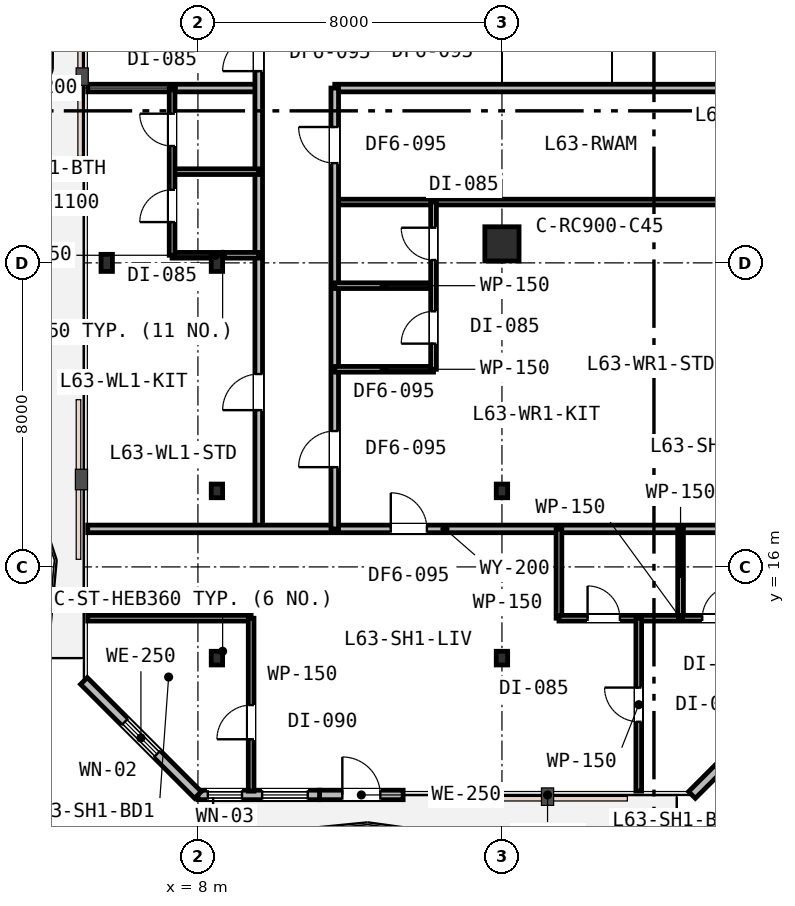
"""IFC4 building model, lengths in metres.
Left out: names, types, materials, properties, quantities, classifications, styles, units other than length and angle.
Written with IfcOpenShell. Run it as: python <this file> out.ifc"""

import sys

from ifc_helpers import new_model, si_unit, direction, frame, frame_2d, origin, origin_2d, place, context, subcontext, project, spatial, rectangle, i_section, extrude, element, fill, save


model = new_model("IFC4")
c1 = context("Model", 3, precision=1e-05, world=origin(), true_north=direction((0.0, 1.0)))
c2 = subcontext(c1, "Body", "Model", "MODEL_VIEW")
j1 = project(units=[si_unit("LENGTHUNIT", "METRE"), si_unit("PLANEANGLEUNIT", "RADIAN")], contexts=[c1])
p1 = place(None, origin())
s1 = spatial("IfcSite", under=j1, at=p1, CompositionType="ELEMENT")
p2 = place(p1, origin())
s2 = spatial("IfcBuilding", under=s1, at=p2, CompositionType="ELEMENT")
p3 = place(p2, frame((0.0, 0.0, 245.0)))
s3 = spatial("IfcBuildingStorey", under=s2, at=p3, CompositionType="ELEMENT", Elevation=245.0)
p4 = place(p3, frame((8.5, 24.0, 0.0), z_axis=(0.0, 0.0, 1.0), x_axis=(1.0, 0.0, 0.0)))
e1 = element("IfcColumn", 1, at=p4, inside=s3, PredefinedType="COLUMN", context=c2, shape_type="SweptSolid", body=[
    extrude(i_section(OverallWidth=0.3, OverallDepth=0.45, WebThickness=0.014, FlangeThickness=0.026, FilletRadius=0.027, at=origin_2d()), origin(), (0.0, 0.0, 1.0), 3.8),
])
p5 = place(p3, frame((16.0, 24.5, 0.0), z_axis=(0.0, 0.0, 1.0), x_axis=(1.0, 0.0, 0.0)))
e2 = element("IfcColumn", 2, at=p5, inside=s3, PredefinedType="COLUMN", context=c2, shape_type="SweptSolid", body=[
    extrude(rectangle(XDim=0.9, YDim=0.9, at=origin_2d()), origin(), (0.0, 0.0, 1.0), 3.8),
])
p6 = place(p3, frame((5.6, 24.0, 0.0), z_axis=(0.0, 0.0, 1.0), x_axis=(1.0, 0.0, 0.0)))
e3 = element("IfcColumn", 3, at=p6, inside=s3, PredefinedType="COLUMN", context=c2, shape_type="SweptSolid", body=[
    extrude(i_section(OverallWidth=0.3, OverallDepth=0.45, WebThickness=0.014, FlangeThickness=0.026, FilletRadius=0.027, at=origin_2d()), origin(), (0.0, 0.0, 1.0), 3.8),
])
for number, where, z_axis, x_axis in (
    (4, (8.5, 13.6, 0.0), (0.0, 0.0, 1.0), (1.0, 0.0, 0.0)),
    (5, (16.0, 13.6, 0.0), (0.0, 0.0, 1.0), (1.0, 0.0, 0.0)),
    (6, (8.5, 18.0, 0.0), (0.0, 0.0, 1.0), (1.0, 0.0, 0.0)),
    (7, (16.0, 18.0, 0.0), (0.0, 0.0, 1.0), (1.0, 0.0, 0.0)),
):
    element("IfcColumn", number, at=place(p3, frame(where, z_axis=z_axis, x_axis=x_axis)), inside=s3, PredefinedType="COLUMN", context=c2, shape_type="SweptSolid", body=[
        extrude(i_section(OverallWidth=0.3, OverallDepth=0.36, WebThickness=0.013, FlangeThickness=0.022, FilletRadius=0.027, at=origin_2d()), origin(), (0.0, 0.0, 1.0), 3.8),
    ])
p7 = place(p3, frame((11.2, 10.0, 0.0), z_axis=(0.0, 0.0, 1.0), x_axis=(1.0, 0.0, 0.0)))
e8 = element("IfcWall", 8, at=p7, inside=s3, PredefinedType="STANDARD", context=c2, shape_type="SweptSolid", body=[
    extrude(rectangle(XDim=2.2, YDim=0.25, at=frame_2d((1.1, 0.0))), origin(), (0.0, 0.0, 1.0), 3.53),
])
p8 = place(p7, frame((0.6, 0.0, 0.0)))
e9 = element("IfcOpeningElement", 9, at=p8, cuts=e8, PredefinedType="OPENING", context=c2, shape_type="SweptSolid", body=[
    extrude(rectangle(XDim=1.0, YDim=2.15, at=frame_2d((0.5, 1.075))), frame((0.0, 0.135, 0.0), z_axis=(0.0, -1.0, 0.0), x_axis=(1.0, 0.0, 0.0)), (0.0, 0.0, 1.0), 0.27),
])
p9 = place(p3, frame((8.0, 10.0, 0.0), z_axis=(0.0, 0.0, 1.0), x_axis=(1.0, 0.0, 0.0)))
e10 = element("IfcWall", 10, at=p9, inside=s3, PredefinedType="STANDARD", context=c2, shape_type="SweptSolid", body=[
    extrude(rectangle(XDim=3.2, YDim=0.25, at=frame_2d((1.6, 0.0))), origin(), (0.0, 0.0, 1.0), 3.53),
])
p10 = place(p9, frame((0.26, 0.0, 0.9)))
e11 = element("IfcOpeningElement", 11, at=p10, cuts=e10, PredefinedType="OPENING", context=c2, shape_type="SweptSolid", body=[
    extrude(rectangle(XDim=0.9, YDim=1.55, at=frame_2d((0.45, 0.775))), frame((0.0, 0.135, 0.0), z_axis=(0.0, -1.0, 0.0), x_axis=(1.0, 0.0, 0.0)), (0.0, 0.0, 1.0), 0.27),
])
p11 = place(p9, frame((1.69, 0.0, 0.85)))
e12 = element("IfcOpeningElement", 12, at=p11, cuts=e10, PredefinedType="OPENING", context=c2, shape_type="SweptSolid", body=[
    extrude(rectangle(XDim=1.2, YDim=1.6, at=frame_2d((0.6, 0.8))), frame((0.0, 0.135, 0.0), z_axis=(0.0, -1.0, 0.0), x_axis=(1.0, 0.0, 0.0)), (0.0, 0.0, 1.0), 0.27),
])
p12 = place(p3, frame((21.0, 10.0, 0.0), z_axis=(0.0, 0.0, 1.0), x_axis=(0.707106781187, 0.707106781187, 0.0)))
e13 = element("IfcWall", 13, at=p12, inside=s3, PredefinedType="STANDARD", context=c2, shape_type="SweptSolid", body=[
    extrude(rectangle(XDim=4.243, YDim=0.25, at=frame_2d((2.121, 0.0))), origin(), (0.0, 0.0, 1.0), 3.53),
])
p13 = place(p12, frame((1.521, 0.0, 0.85)))
e14 = element("IfcOpeningElement", 14, at=p13, cuts=e13, PredefinedType="OPENING", context=c2, shape_type="SweptSolid", body=[
    extrude(rectangle(XDim=1.2, YDim=1.6, at=frame_2d((0.6, 0.8))), frame((0.0, 0.135, 0.0), z_axis=(0.0, -1.0, 0.0), x_axis=(1.0, 0.0, 0.0)), (0.0, 0.0, 1.0), 0.27),
])
p14 = place(p3, frame((5.0, 13.0, 0.0), z_axis=(0.0, 0.0, 1.0), x_axis=(0.707106781187, -0.707106781187, 0.0)))
e15 = element("IfcWall", 15, at=p14, inside=s3, PredefinedType="STANDARD", context=c2, shape_type="SweptSolid", body=[
    extrude(rectangle(XDim=4.243, YDim=0.25, at=frame_2d((2.121, 0.0))), origin(), (0.0, 0.0, 1.0), 3.53),
])
p15 = place(p14, frame((1.521, 0.0, 0.85)))
e16 = element("IfcOpeningElement", 16, at=p15, cuts=e15, PredefinedType="OPENING", context=c2, shape_type="SweptSolid", body=[
    extrude(rectangle(XDim=1.2, YDim=1.6, at=frame_2d((0.6, 0.8))), frame((0.0, 0.135, 0.0), z_axis=(0.0, -1.0, 0.0), x_axis=(1.0, 0.0, 0.0)), (0.0, 0.0, 1.0), 0.27),
])
p16 = place(p3, frame((5.1, 28.6, 0.0), z_axis=(0.0, 0.0, 1.0), x_axis=(1.0, 0.0, 0.0)))
e17 = element("IfcWall", 17, at=p16, inside=s3, PredefinedType="PARTITIONING", context=c2, shape_type="SweptSolid", body=[
    extrude(rectangle(XDim=4.5, YDim=0.2, at=frame_2d((2.25, 0.0))), origin(), (0.0, 0.0, 1.0), 3.16),
])
p17 = place(p3, frame((11.6, 28.6, 0.0), z_axis=(0.0, 0.0, 1.0), x_axis=(1.0, 0.0, 0.0)))
e18 = element("IfcWall", 18, at=p17, inside=s3, PredefinedType="PARTITIONING", context=c2, shape_type="SweptSolid", body=[
    extrude(rectangle(XDim=34.3, YDim=0.2, at=frame_2d((17.15, 0.0))), origin(), (0.0, 0.0, 1.0), 3.16),
])
p18 = place(p17, frame((14.625, 0.0, 0.0)))
e19 = element("IfcOpeningElement", 19, at=p18, cuts=e18, PredefinedType="OPENING", context=c2, shape_type="SweptSolid", body=[
    extrude(rectangle(XDim=0.95, YDim=2.15, at=frame_2d((0.475, 1.075))), frame((0.0, 0.11, 0.0), z_axis=(0.0, -1.0, 0.0), x_axis=(1.0, 0.0, 0.0)), (0.0, 0.0, 1.0), 0.22),
])
p19 = place(p17, frame((26.225, 0.0, 0.0)))
e20 = element("IfcOpeningElement", 20, at=p19, cuts=e18, PredefinedType="OPENING", context=c2, shape_type="SweptSolid", body=[
    extrude(rectangle(XDim=0.95, YDim=2.15, at=frame_2d((0.475, 1.075))), frame((0.0, 0.11, 0.0), z_axis=(0.0, -1.0, 0.0), x_axis=(1.0, 0.0, 0.0)), (0.0, 0.0, 1.0), 0.22),
])
p20 = place(p3, frame((9.6, 17.0, 0.0), z_axis=(0.0, 0.0, 1.0), x_axis=(0.0, 1.0, 0.0)))
e21 = element("IfcWall", 21, at=p20, inside=s3, PredefinedType="PARTITIONING", context=c2, shape_type="SweptSolid", body=[
    extrude(rectangle(XDim=25.9, YDim=0.2, at=frame_2d((12.95, 0.0))), origin(), (0.0, 0.0, 1.0), 3.16),
])
p21 = place(p20, frame((12.045, 0.0, 0.0)))
e22 = element("IfcOpeningElement", 22, at=p21, cuts=e21, PredefinedType="OPENING", context=c2, shape_type="SweptSolid", body=[
    extrude(rectangle(XDim=0.95, YDim=2.15, at=frame_2d((0.475, 1.075))), frame((0.0, 0.11, 0.0), z_axis=(0.0, -1.0, 0.0), x_axis=(1.0, 0.0, 0.0)), (0.0, 0.0, 1.0), 0.22),
])
p22 = place(p20, frame((3.125, 0.0, 0.0)))
e23 = element("IfcOpeningElement", 23, at=p22, cuts=e21, PredefinedType="OPENING", context=c2, shape_type="SweptSolid", body=[
    extrude(rectangle(XDim=0.95, YDim=2.15, at=frame_2d((0.475, 1.075))), frame((0.0, 0.11, 0.0), z_axis=(0.0, -1.0, 0.0), x_axis=(1.0, 0.0, 0.0)), (0.0, 0.0, 1.0), 0.22),
])
p23 = place(p3, frame((5.1, 17.0, 0.0), z_axis=(0.0, 0.0, 1.0), x_axis=(1.0, 0.0, 0.0)))
e24 = element("IfcWall", 24, at=p23, inside=s3, PredefinedType="PARTITIONING", context=c2, shape_type="SweptSolid", body=[
    extrude(rectangle(XDim=18.8, YDim=0.2, at=frame_2d((9.4, 0.0))), origin(), (0.0, 0.0, 1.0), 3.16),
])
p24 = place(p23, frame((7.975, 0.0, 0.0)))
e25 = element("IfcOpeningElement", 25, at=p24, cuts=e24, PredefinedType="OPENING", context=c2, shape_type="SweptSolid", body=[
    extrude(rectangle(XDim=0.95, YDim=2.15, at=frame_2d((0.475, 1.075))), frame((0.0, 0.11, 0.0), z_axis=(0.0, -1.0, 0.0), x_axis=(1.0, 0.0, 0.0)), (0.0, 0.0, 1.0), 0.22),
])
for number, where, z_axis, x_axis in (
    (26, (7.32, 24.2, 0.0), (0.0, 0.0, 1.0), (1.0, 0.0, 0.0)),
    (27, (7.32, 26.4, 0.0), (0.0, 0.0, 1.0), (1.0, 0.0, 0.0)),
):
    element("IfcWall", number, at=place(p3, frame(where, z_axis=z_axis, x_axis=x_axis)), inside=s3, PredefinedType="PARTITIONING", context=c2, shape_type="SweptSolid", body=[
        extrude(rectangle(XDim=2.28, YDim=0.15, at=frame_2d((1.14, 0.0))), origin(), (0.0, 0.0, 1.0), 3.16),
    ])
p25 = place(p3, frame((7.32, 24.2, 0.0), z_axis=(0.0, 0.0, 1.0), x_axis=(0.0, 1.0, 0.0)))
e28 = element("IfcWall", 28, at=p25, inside=s3, PredefinedType="PARTITIONING", context=c2, shape_type="SweptSolid", body=[
    extrude(rectangle(XDim=4.4, YDim=0.15, at=frame_2d((2.2, 0.0))), origin(), (0.0, 0.0, 1.0), 3.16),
])
p26 = place(p25, frame((0.873, 0.0, 0.0)))
e29 = element("IfcOpeningElement", 29, at=p26, cuts=e28, PredefinedType="OPENING", context=c2, shape_type="SweptSolid", body=[
    extrude(rectangle(XDim=0.85, YDim=2.15, at=frame_2d((0.425, 1.075))), frame((0.0, 0.085, 0.0), z_axis=(0.0, -1.0, 0.0), x_axis=(1.0, 0.0, 0.0)), (0.0, 0.0, 1.0), 0.17),
])
p27 = place(p25, frame((2.875, 0.0, 0.0)))
e30 = element("IfcOpeningElement", 30, at=p27, cuts=e28, PredefinedType="OPENING", context=c2, shape_type="SweptSolid", body=[
    extrude(rectangle(XDim=0.85, YDim=2.15, at=frame_2d((0.425, 1.075))), frame((0.0, 0.085, 0.0), z_axis=(0.0, -1.0, 0.0), x_axis=(1.0, 0.0, 0.0)), (0.0, 0.0, 1.0), 0.17),
])
p28 = place(p3, frame((11.6, 25.6, 0.0), z_axis=(0.0, 0.0, 1.0), x_axis=(1.0, 0.0, 0.0)))
e31 = element("IfcWall", 31, at=p28, inside=s3, PredefinedType="PARTITIONING", context=c2, shape_type="SweptSolid", body=[
    extrude(rectangle(XDim=12.3, YDim=0.15, at=frame_2d((6.15, 0.0))), origin(), (0.0, 0.0, 1.0), 3.16),
])
p29 = place(p3, frame((11.6, 17.0, 0.0), z_axis=(0.0, 0.0, 1.0), x_axis=(0.0, 1.0, 0.0)))
e32 = element("IfcWall", 32, at=p29, inside=s3, PredefinedType="PARTITIONING", context=c2, shape_type="SweptSolid", body=[
    extrude(rectangle(XDim=11.6, YDim=0.2, at=frame_2d((5.8, 0.0))), origin(), (0.0, 0.0, 1.0), 3.16),
])
p30 = place(p29, frame((9.625, 0.0, 0.0)))
e33 = element("IfcOpeningElement", 33, at=p30, cuts=e32, PredefinedType="OPENING", context=c2, shape_type="SweptSolid", body=[
    extrude(rectangle(XDim=0.95, YDim=2.15, at=frame_2d((0.475, 1.075))), frame((0.0, 0.11, 0.0), z_axis=(0.0, -1.0, 0.0), x_axis=(1.0, 0.0, 0.0)), (0.0, 0.0, 1.0), 0.22),
])
p31 = place(p29, frame((1.625, 0.0, 0.0)))
e34 = element("IfcOpeningElement", 34, at=p31, cuts=e32, PredefinedType="OPENING", context=c2, shape_type="SweptSolid", body=[
    extrude(rectangle(XDim=0.95, YDim=2.15, at=frame_2d((0.475, 1.075))), frame((0.0, 0.11, 0.0), z_axis=(0.0, -1.0, 0.0), x_axis=(1.0, 0.0, 0.0)), (0.0, 0.0, 1.0), 0.22),
])
for number, where, z_axis, x_axis in (
    (35, (11.6, 21.2, 0.0), (0.0, 0.0, 1.0), (1.0, 0.0, 0.0)),
    (36, (11.6, 23.4, 0.0), (0.0, 0.0, 1.0), (1.0, 0.0, 0.0)),
):
    element("IfcWall", number, at=place(p3, frame(where, z_axis=z_axis, x_axis=x_axis)), inside=s3, PredefinedType="PARTITIONING", context=c2, shape_type="SweptSolid", body=[
        extrude(rectangle(XDim=2.6, YDim=0.15, at=frame_2d((1.3, 0.0))), origin(), (0.0, 0.0, 1.0), 3.53),
    ])
p32 = place(p3, frame((14.2, 21.2, 0.0), z_axis=(0.0, 0.0, 1.0), x_axis=(0.0, 1.0, 0.0)))
e37 = element("IfcWall", 37, at=p32, inside=s3, PredefinedType="PARTITIONING", context=c2, shape_type="SweptSolid", body=[
    extrude(rectangle(XDim=4.4, YDim=0.15, at=frame_2d((2.2, 0.0))), origin(), (0.0, 0.0, 1.0), 3.16),
])
p33 = place(p32, frame((0.675, 0.0, 0.0)))
e38 = element("IfcOpeningElement", 38, at=p33, cuts=e37, PredefinedType="OPENING", context=c2, shape_type="SweptSolid", body=[
    extrude(rectangle(XDim=0.85, YDim=2.15, at=frame_2d((0.425, 1.075))), frame((0.0, 0.085, 0.0), z_axis=(0.0, -1.0, 0.0), x_axis=(1.0, 0.0, 0.0)), (0.0, 0.0, 1.0), 0.17),
])
p34 = place(p32, frame((2.875, 0.0, 0.0)))
e39 = element("IfcOpeningElement", 39, at=p34, cuts=e37, PredefinedType="OPENING", context=c2, shape_type="SweptSolid", body=[
    extrude(rectangle(XDim=0.85, YDim=2.15, at=frame_2d((0.425, 1.075))), frame((0.0, 0.085, 0.0), z_axis=(0.0, -1.0, 0.0), x_axis=(1.0, 0.0, 0.0)), (0.0, 0.0, 1.0), 0.17),
])
p35 = place(p3, frame((17.5, 14.65, 0.0), z_axis=(0.0, 0.0, 1.0), x_axis=(0.0, 1.0, 0.0)))
e40 = element("IfcWall", 40, at=p35, inside=s3, PredefinedType="PARTITIONING", context=c2, shape_type="SweptSolid", body=[
    extrude(rectangle(XDim=2.35, YDim=0.15, at=frame_2d((1.175, 0.0))), origin(), (0.0, 0.0, 1.0), 3.53),
])
p36 = place(p3, frame((20.7, 14.65, 0.0), z_axis=(0.0, 0.0, 1.0), x_axis=(0.0, 1.0, 0.0)))
e41 = element("IfcWall", 41, at=p36, inside=s3, PredefinedType="PARTITIONING", context=c2, shape_type="SweptSolid", body=[
    extrude(rectangle(XDim=2.35, YDim=0.15, at=frame_2d((1.175, 0.0))), origin(), (0.0, 0.0, 1.0), 3.28),
])
p37 = place(p3, frame((17.5, 14.65, 0.0), z_axis=(0.0, 0.0, 1.0), x_axis=(1.0, 0.0, 0.0)))
e42 = element("IfcWall", 42, at=p37, inside=s3, PredefinedType="PARTITIONING", context=c2, shape_type="SweptSolid", body=[
    extrude(rectangle(XDim=6.4, YDim=0.15, at=frame_2d((3.2, 0.0))), origin(), (0.0, 0.0, 1.0), 3.27),
])
p38 = place(p37, frame((0.753, 0.0, 0.0)))
e43 = element("IfcOpeningElement", 43, at=p38, cuts=e42, PredefinedType="OPENING", context=c2, shape_type="SweptSolid", body=[
    extrude(rectangle(XDim=0.85, YDim=2.15, at=frame_2d((0.425, 1.075))), frame((0.0, 0.085, 0.0), z_axis=(0.0, -1.0, 0.0), x_axis=(1.0, 0.0, 0.0)), (0.0, 0.0, 1.0), 0.17),
])
p39 = place(p37, frame((3.771, 0.0, 0.0)))
e44 = element("IfcOpeningElement", 44, at=p39, cuts=e42, PredefinedType="OPENING", context=c2, shape_type="SweptSolid", body=[
    extrude(rectangle(XDim=0.85, YDim=2.15, at=frame_2d((0.425, 1.075))), frame((0.0, 0.085, 0.0), z_axis=(0.0, -1.0, 0.0), x_axis=(1.0, 0.0, 0.0)), (0.0, 0.0, 1.0), 0.17),
])
p40 = place(p3, frame((5.1, 14.65, 0.0), z_axis=(0.0, 0.0, 1.0), x_axis=(1.0, 0.0, 0.0)))
e45 = element("IfcWall", 45, at=p40, inside=s3, PredefinedType="PARTITIONING", context=c2, shape_type="SweptSolid", body=[
    extrude(rectangle(XDim=4.3, YDim=0.15, at=frame_2d((2.15, 0.0))), origin(), (0.0, 0.0, 1.0), 3.16),
])
p41 = place(p3, frame((9.4, 10.1, 0.0), z_axis=(0.0, 0.0, 1.0), x_axis=(0.0, 1.0, 0.0)))
e46 = element("IfcWall", 46, at=p41, inside=s3, PredefinedType="PARTITIONING", context=c2, shape_type="SweptSolid", body=[
    extrude(rectangle(XDim=4.55, YDim=0.15, at=frame_2d((2.275, 0.0))), origin(), (0.0, 0.0, 1.0), 3.16),
])
p42 = place(p41, frame((1.365, 0.0, 0.0)))
e47 = element("IfcOpeningElement", 47, at=p42, cuts=e46, PredefinedType="OPENING", context=c2, shape_type="SweptSolid", body=[
    extrude(rectangle(XDim=0.9, YDim=2.15, at=frame_2d((0.45, 1.075))), frame((0.0, 0.085, 0.0), z_axis=(0.0, -1.0, 0.0), x_axis=(1.0, 0.0, 0.0)), (0.0, 0.0, 1.0), 0.17),
])
p43 = place(p3, frame((19.6, 10.1, 0.0), z_axis=(0.0, 0.0, 1.0), x_axis=(0.0, 1.0, 0.0)))
e48 = element("IfcWall", 48, at=p43, inside=s3, PredefinedType="PARTITIONING", context=c2, shape_type="SweptSolid", body=[
    extrude(rectangle(XDim=4.55, YDim=0.15, at=frame_2d((2.275, 0.0))), origin(), (0.0, 0.0, 1.0), 3.16),
])
p44 = place(p43, frame((1.825, 0.0, 0.0)))
e49 = element("IfcOpeningElement", 49, at=p44, cuts=e48, PredefinedType="OPENING", context=c2, shape_type="SweptSolid", body=[
    extrude(rectangle(XDim=0.9, YDim=2.15, at=frame_2d((0.45, 1.075))), frame((0.0, 0.085, 0.0), z_axis=(0.0, -1.0, 0.0), x_axis=(1.0, 0.0, 0.0)), (0.0, 0.0, 1.0), 0.17),
])
p45 = place(p8, origin())
e50 = element("IfcDoor", 50, at=p45, inside=s3, OperationType="SINGLE_SWING_LEFT", PredefinedType="DOOR", context=c2, shape_type="SweptSolid", body=[
    extrude(rectangle(XDim=1.0, YDim=2.15, at=frame_2d((0.5, 1.075))), frame((0.0, 0.025, 0.0), z_axis=(0.0, -1.0, 0.0), x_axis=(1.0, 0.0, 0.0)), (0.0, 0.0, 1.0), 0.05),
])
fill(e9, e50)
p46 = place(p10, origin())
e51 = element("IfcWindow", 51, at=p46, inside=s3, PartitioningType="SINGLE_PANEL", PredefinedType="WINDOW", context=c2, shape_type="SweptSolid", body=[
    extrude(rectangle(XDim=0.9, YDim=1.55, at=frame_2d((0.45, 0.775))), frame((0.0, 0.03, 0.0), z_axis=(0.0, -1.0, 0.0), x_axis=(1.0, 0.0, 0.0)), (0.0, 0.0, 1.0), 0.06),
])
fill(e11, e51)
p47 = place(p11, origin())
e52 = element("IfcWindow", 52, at=p47, inside=s3, PartitioningType="SINGLE_PANEL", PredefinedType="WINDOW", context=c2, shape_type="SweptSolid", body=[
    extrude(rectangle(XDim=1.2, YDim=1.6, at=frame_2d((0.6, 0.8))), frame((0.0, 0.03, 0.0), z_axis=(0.0, -1.0, 0.0), x_axis=(1.0, 0.0, 0.0)), (0.0, 0.0, 1.0), 0.06),
])
fill(e12, e52)
p48 = place(p15, origin())
e53 = element("IfcWindow", 53, at=p48, inside=s3, PartitioningType="SINGLE_PANEL", PredefinedType="WINDOW", context=c2, shape_type="SweptSolid", body=[
    extrude(rectangle(XDim=1.2, YDim=1.6, at=frame_2d((0.6, 0.8))), frame((0.0, 0.03, 0.0), z_axis=(0.0, -1.0, 0.0), x_axis=(1.0, 0.0, 0.0)), (0.0, 0.0, 1.0), 0.06),
])
fill(e16, e53)
p49 = place(p21, origin())
e54 = element("IfcDoor", 54, at=p49, inside=s3, OperationType="SINGLE_SWING_LEFT", PredefinedType="DOOR", context=c2, shape_type="SweptSolid", body=[
    extrude(rectangle(XDim=0.95, YDim=2.15, at=frame_2d((0.475, 1.075))), frame((0.0, 0.025, 0.0), z_axis=(0.0, -1.0, 0.0), x_axis=(1.0, 0.0, 0.0)), (0.0, 0.0, 1.0), 0.05),
])
fill(e22, e54)
p50 = place(p22, origin())
e55 = element("IfcDoor", 55, at=p50, inside=s3, OperationType="SINGLE_SWING_LEFT", PredefinedType="DOOR", context=c2, shape_type="SweptSolid", body=[
    extrude(rectangle(XDim=0.95, YDim=2.15, at=frame_2d((0.475, 1.075))), frame((0.0, 0.025, 0.0), z_axis=(0.0, -1.0, 0.0), x_axis=(1.0, 0.0, 0.0)), (0.0, 0.0, 1.0), 0.05),
])
fill(e23, e55)
p51 = place(p26, origin())
e56 = element("IfcDoor", 56, at=p51, inside=s3, OperationType="SINGLE_SWING_LEFT", PredefinedType="DOOR", context=c2, shape_type="SweptSolid", body=[
    extrude(rectangle(XDim=0.85, YDim=2.15, at=frame_2d((0.425, 1.075))), frame((0.0, 0.025, 0.0), z_axis=(0.0, -1.0, 0.0), x_axis=(1.0, 0.0, 0.0)), (0.0, 0.0, 1.0), 0.05),
])
fill(e29, e56)
p52 = place(p27, origin())
e57 = element("IfcDoor", 57, at=p52, inside=s3, OperationType="SINGLE_SWING_RIGHT", PredefinedType="DOOR", context=c2, shape_type="SweptSolid", body=[
    extrude(rectangle(XDim=0.85, YDim=2.15, at=frame_2d((0.425, 1.075))), frame((0.0, 0.025, 0.0), z_axis=(0.0, -1.0, 0.0), x_axis=(1.0, 0.0, 0.0)), (0.0, 0.0, 1.0), 0.05),
])
fill(e30, e57)
p53 = place(p30, origin())
e58 = element("IfcDoor", 58, at=p53, inside=s3, OperationType="SINGLE_SWING_RIGHT", PredefinedType="DOOR", context=c2, shape_type="SweptSolid", body=[
    extrude(rectangle(XDim=0.95, YDim=2.15, at=frame_2d((0.475, 1.075))), frame((0.0, 0.025, 0.0), z_axis=(0.0, -1.0, 0.0), x_axis=(1.0, 0.0, 0.0)), (0.0, 0.0, 1.0), 0.05),
])
fill(e33, e58)
p54 = place(p31, origin())
e59 = element("IfcDoor", 59, at=p54, inside=s3, OperationType="SINGLE_SWING_LEFT", PredefinedType="DOOR", context=c2, shape_type="SweptSolid", body=[
    extrude(rectangle(XDim=0.95, YDim=2.15, at=frame_2d((0.475, 1.075))), frame((0.0, 0.025, 0.0), z_axis=(0.0, -1.0, 0.0), x_axis=(1.0, 0.0, 0.0)), (0.0, 0.0, 1.0), 0.05),
])
fill(e34, e59)
p55 = place(p33, origin())
e60 = element("IfcDoor", 60, at=p55, inside=s3, OperationType="SINGLE_SWING_LEFT", PredefinedType="DOOR", context=c2, shape_type="SweptSolid", body=[
    extrude(rectangle(XDim=0.85, YDim=2.15, at=frame_2d((0.425, 1.075))), frame((0.0, 0.025, 0.0), z_axis=(0.0, -1.0, 0.0), x_axis=(1.0, 0.0, 0.0)), (0.0, 0.0, 1.0), 0.05),
])
fill(e38, e60)
p56 = place(p34, origin())
e61 = element("IfcDoor", 61, at=p56, inside=s3, OperationType="SINGLE_SWING_RIGHT", PredefinedType="DOOR", context=c2, shape_type="SweptSolid", body=[
    extrude(rectangle(XDim=0.85, YDim=2.15, at=frame_2d((0.425, 1.075))), frame((0.0, 0.025, 0.0), z_axis=(0.0, -1.0, 0.0), x_axis=(1.0, 0.0, 0.0)), (0.0, 0.0, 1.0), 0.05),
])
fill(e39, e61)
p57 = place(p24, origin())
e62 = element("IfcDoor", 62, at=p57, inside=s3, OperationType="SINGLE_SWING_LEFT", PredefinedType="DOOR", context=c2, shape_type="SweptSolid", body=[
    extrude(rectangle(XDim=0.95, YDim=2.15, at=frame_2d((0.475, 1.075))), frame((0.0, 0.025, 0.0), z_axis=(0.0, -1.0, 0.0), x_axis=(1.0, 0.0, 0.0)), (0.0, 0.0, 1.0), 0.05),
])
fill(e25, e62)
p58 = place(p38, origin())
e63 = element("IfcDoor", 63, at=p58, inside=s3, OperationType="SINGLE_SWING_LEFT", PredefinedType="DOOR", context=c2, shape_type="SweptSolid", body=[
    extrude(rectangle(XDim=0.85, YDim=2.15, at=frame_2d((0.425, 1.075))), frame((0.0, 0.025, 0.0), z_axis=(0.0, -1.0, 0.0), x_axis=(1.0, 0.0, 0.0)), (0.0, 0.0, 1.0), 0.05),
])
fill(e43, e63)
p59 = place(p39, origin())
e64 = element("IfcDoor", 64, at=p59, inside=s3, OperationType="SINGLE_SWING_RIGHT", PredefinedType="DOOR", context=c2, shape_type="SweptSolid", body=[
    extrude(rectangle(XDim=0.85, YDim=2.15, at=frame_2d((0.425, 1.075))), frame((0.0, 0.025, 0.0), z_axis=(0.0, -1.0, 0.0), x_axis=(1.0, 0.0, 0.0)), (0.0, 0.0, 1.0), 0.05),
])
fill(e44, e64)
p60 = place(p42, origin())
e65 = element("IfcDoor", 65, at=p60, inside=s3, OperationType="SINGLE_SWING_LEFT", PredefinedType="DOOR", context=c2, shape_type="SweptSolid", body=[
    extrude(rectangle(XDim=0.9, YDim=2.15, at=frame_2d((0.45, 1.075))), frame((0.0, 0.025, 0.0), z_axis=(0.0, -1.0, 0.0), x_axis=(1.0, 0.0, 0.0)), (0.0, 0.0, 1.0), 0.05),
])
fill(e47, e65)
p61 = place(p44, origin())
e66 = element("IfcDoor", 66, at=p61, inside=s3, OperationType="SINGLE_SWING_RIGHT", PredefinedType="DOOR", context=c2, shape_type="SweptSolid", body=[
    extrude(rectangle(XDim=0.9, YDim=2.15, at=frame_2d((0.45, 1.075))), frame((0.0, 0.025, 0.0), z_axis=(0.0, -1.0, 0.0), x_axis=(1.0, 0.0, 0.0)), (0.0, 0.0, 1.0), 0.05),
])
fill(e49, e66)
save(model, sys.argv[1])
